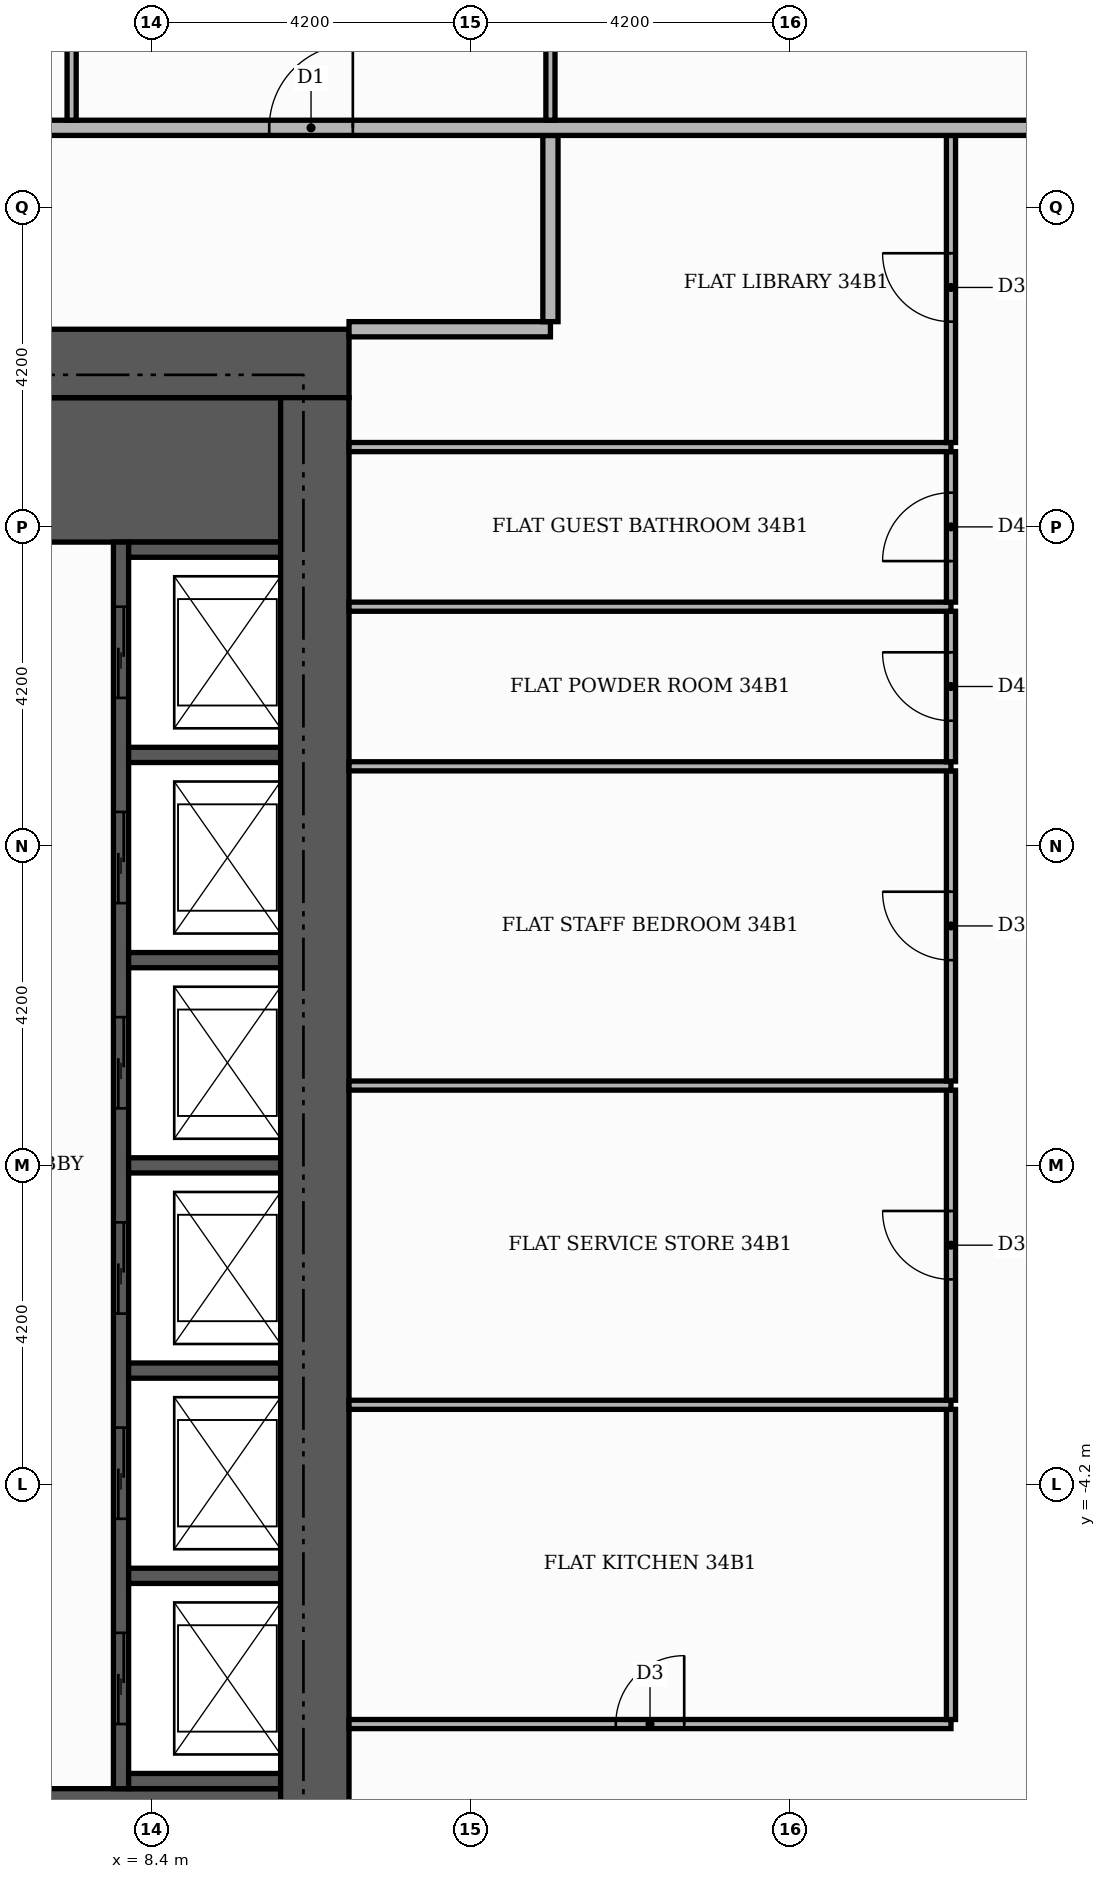
"""IFC4 building model, lengths in metres.
Left out: names, types, materials, properties, quantities, classifications, styles, units other than length and angle.
Written with IfcOpenShell. Run it as: python <this file> out.ifc"""

import sys

from ifc_helpers import new_model, si_unit, direction, frame, frame_2d, origin, place, context, subcontext, project, spatial, rectangle, extrude, element, fill, save


model = new_model("IFC4")
c1 = context("Model", 3, precision=1e-05, world=origin(), true_north=direction((0.0, 1.0)))
c2 = subcontext(c1, "Body", "Model", "MODEL_VIEW")
j1 = project(units=[si_unit("LENGTHUNIT", "METRE"), si_unit("PLANEANGLEUNIT", "RADIAN")], contexts=[c1])
p1 = place(None, origin())
s1 = spatial("IfcSite", under=j1, at=p1, CompositionType="ELEMENT")
p2 = place(p1, origin())
s2 = spatial("IfcBuilding", under=s1, at=p2, CompositionType="ELEMENT")
p3 = place(p2, frame((0.0, 0.0, 145.5)))
s3 = spatial("IfcBuildingStorey", under=s2, at=p3, CompositionType="ELEMENT", Elevation=145.5)
for number, where, z_axis, x_axis in (
    (1, (5.5, -9.15, 0.0), (0.0, 0.0, 1.0), (1.0, 0.0, 0.0)),
    (2, (5.5, 9.15, 0.0), (0.0, 0.0, 1.0), (1.0, 0.0, 0.0)),
):
    element("IfcWall", number, at=place(p3, frame(where, z_axis=z_axis, x_axis=x_axis)), inside=s3, PredefinedType="SHEAR", context=c2, shape_type="SweptSolid", body=[
        extrude(rectangle(XDim=4.6, YDim=1.9, at=frame_2d((2.3, 0.0))), origin(), (0.0, 0.0, 1.0), 3.48),
    ])
p4 = place(p3, frame((8.0, -8.2, 0.0), z_axis=(0.0, 0.0, 1.0), x_axis=(0.0, 1.0, 0.0)))
e3 = element("IfcWall", 3, at=p4, inside=s3, PredefinedType="SHEAR", context=c2, shape_type="SweptSolid", body=[
    extrude(rectangle(XDim=16.4, YDim=0.2, at=frame_2d((8.2, 0.0))), origin(), (0.0, 0.0, 1.0), 3.48),
])
p5 = place(p4, frame((0.85, 0.0, 0.0)))
e4 = element("IfcOpeningElement", 4, at=p5, cuts=e3, PredefinedType="OPENING", context=c2, shape_type="SweptSolid", body=[
    extrude(rectangle(XDim=1.2, YDim=2.1, at=frame_2d((0.6, 1.05))), frame((0.0, 0.11, 0.0), z_axis=(0.0, -1.0, 0.0), x_axis=(1.0, 0.0, 0.0)), (0.0, 0.0, 1.0), 0.22),
])
p6 = place(p4, frame((3.55, 0.0, 0.0)))
e5 = element("IfcOpeningElement", 5, at=p6, cuts=e3, PredefinedType="OPENING", context=c2, shape_type="SweptSolid", body=[
    extrude(rectangle(XDim=1.2, YDim=2.1, at=frame_2d((0.6, 1.05))), frame((0.0, 0.11, 0.0), z_axis=(0.0, -1.0, 0.0), x_axis=(1.0, 0.0, 0.0)), (0.0, 0.0, 1.0), 0.22),
])
p7 = place(p4, frame((6.25, 0.0, 0.0)))
e6 = element("IfcOpeningElement", 6, at=p7, cuts=e3, PredefinedType="OPENING", context=c2, shape_type="SweptSolid", body=[
    extrude(rectangle(XDim=1.2, YDim=2.1, at=frame_2d((0.6, 1.05))), frame((0.0, 0.11, 0.0), z_axis=(0.0, -1.0, 0.0), x_axis=(1.0, 0.0, 0.0)), (0.0, 0.0, 1.0), 0.22),
])
p8 = place(p4, frame((8.95, 0.0, 0.0)))
e7 = element("IfcOpeningElement", 7, at=p8, cuts=e3, PredefinedType="OPENING", context=c2, shape_type="SweptSolid", body=[
    extrude(rectangle(XDim=1.2, YDim=2.1, at=frame_2d((0.6, 1.05))), frame((0.0, 0.11, 0.0), z_axis=(0.0, -1.0, 0.0), x_axis=(1.0, 0.0, 0.0)), (0.0, 0.0, 1.0), 0.22),
])
p9 = place(p4, frame((11.65, 0.0, 0.0)))
e8 = element("IfcOpeningElement", 8, at=p9, cuts=e3, PredefinedType="OPENING", context=c2, shape_type="SweptSolid", body=[
    extrude(rectangle(XDim=1.2, YDim=2.1, at=frame_2d((0.6, 1.05))), frame((0.0, 0.11, 0.0), z_axis=(0.0, -1.0, 0.0), x_axis=(1.0, 0.0, 0.0)), (0.0, 0.0, 1.0), 0.22),
])
p10 = place(p4, frame((14.35, 0.0, 0.0)))
e9 = element("IfcOpeningElement", 9, at=p10, cuts=e3, PredefinedType="OPENING", context=c2, shape_type="SweptSolid", body=[
    extrude(rectangle(XDim=1.2, YDim=2.1, at=frame_2d((0.6, 1.05))), frame((0.0, 0.11, 0.0), z_axis=(0.0, -1.0, 0.0), x_axis=(1.0, 0.0, 0.0)), (0.0, 0.0, 1.0), 0.22),
])
for number, where, z_axis, x_axis in (
    (10, (8.1, -8.1, 0.0), (0.0, 0.0, 1.0), (1.0, 0.0, 0.0)),
    (11, (8.1, -5.4, 0.0), (0.0, 0.0, 1.0), (1.0, 0.0, 0.0)),
    (12, (8.1, -2.7, 0.0), (0.0, 0.0, 1.0), (1.0, 0.0, 0.0)),
    (13, (8.1, 0.0, 0.0), (0.0, 0.0, 1.0), (1.0, 0.0, 0.0)),
    (14, (8.1, 2.7, 0.0), (0.0, 0.0, 1.0), (1.0, 0.0, 0.0)),
    (15, (8.1, 5.4, 0.0), (0.0, 0.0, 1.0), (1.0, 0.0, 0.0)),
    (16, (8.1, 8.1, 0.0), (0.0, 0.0, 1.0), (1.0, 0.0, 0.0)),
):
    element("IfcWall", number, at=place(p3, frame(where, z_axis=z_axis, x_axis=x_axis)), inside=s3, PredefinedType="SHEAR", context=c2, shape_type="SweptSolid", body=[
        extrude(rectangle(XDim=2.0, YDim=0.2, at=frame_2d((1.0, 0.0))), origin(), (0.0, 0.0, 1.0), 3.48),
    ])
p11 = place(p3, frame((-11.0, 10.55, 0.0), z_axis=(0.0, 0.0, 1.0), x_axis=(1.0, 0.0, 0.0)))
e17 = element("IfcWall", 17, at=p11, inside=s3, PredefinedType="SHEAR", context=c2, shape_type="SweptSolid", body=[
    extrude(rectangle(XDim=22.0, YDim=0.9, at=frame_2d((11.0, 0.0))), origin(), (0.0, 0.0, 1.0), 3.48),
])
p12 = place(p11, frame((13.3, 0.0, 0.0)))
e18 = element("IfcOpeningElement", 18, at=p12, cuts=e17, PredefinedType="OPENING", context=c2, shape_type="SweptSolid", body=[
    extrude(rectangle(XDim=1.8, YDim=2.2, at=frame_2d((0.9, 1.1))), frame((0.0, 0.46, 0.0), z_axis=(0.0, -1.0, 0.0), x_axis=(1.0, 0.0, 0.0)), (0.0, 0.0, 1.0), 0.92),
])
p13 = place(p3, frame((10.55, -10.1, 0.0), z_axis=(0.0, 0.0, 1.0), x_axis=(0.0, 1.0, 0.0)))
e19 = element("IfcWall", 19, at=p13, inside=s3, PredefinedType="SHEAR", context=c2, shape_type="SweptSolid", body=[
    extrude(rectangle(XDim=20.2, YDim=0.9, at=frame_2d((10.1, 0.0))), origin(), (0.0, 0.0, 1.0), 3.48),
])
p14 = place(p3, frame((11.0, -7.35, 0.0), z_axis=(0.0, 0.0, 1.0), x_axis=(1.0, 0.0, 0.0)))
e20 = element("IfcWall", 20, at=p14, inside=s3, PredefinedType="PARTITIONING", context=c2, shape_type="SweptSolid", body=[
    extrude(rectangle(XDim=7.92, YDim=0.12, at=frame_2d((3.96, 0.0))), origin(), (0.0, 0.0, 1.0), 3.48),
])
p15 = place(p14, frame((3.51, 0.0, 0.0)))
e21 = element("IfcOpeningElement", 21, at=p15, cuts=e20, PredefinedType="OPENING", context=c2, shape_type="SweptSolid", body=[
    extrude(rectangle(XDim=0.9, YDim=2.1, at=frame_2d((0.45, 1.05))), frame((0.0, 0.07, 0.0), z_axis=(0.0, -1.0, 0.0), x_axis=(1.0, 0.0, 0.0)), (0.0, 0.0, 1.0), 0.14),
])
p16 = place(p3, frame((18.92, -7.29, 0.0), z_axis=(0.0, 0.0, 1.0), x_axis=(0.0, 1.0, 0.0)))
e22 = element("IfcWall", 22, at=p16, inside=s3, PredefinedType="PARTITIONING", context=c2, shape_type="SweptSolid", body=[
    extrude(rectangle(XDim=4.08, YDim=0.12, at=frame_2d((2.04, 0.0))), origin(), (0.0, 0.0, 1.0), 3.48),
])
p17 = place(p3, frame((11.0, -3.15, 0.0), z_axis=(0.0, 0.0, 1.0), x_axis=(1.0, 0.0, 0.0)))
e23 = element("IfcWall", 23, at=p17, inside=s3, PredefinedType="PARTITIONING", context=c2, shape_type="SweptSolid", body=[
    extrude(rectangle(XDim=7.92, YDim=0.12, at=frame_2d((3.96, 0.0))), origin(), (0.0, 0.0, 1.0), 3.48),
])
p18 = place(p3, frame((18.92, -3.09, 0.0), z_axis=(0.0, 0.0, 1.0), x_axis=(0.0, 1.0, 0.0)))
e24 = element("IfcWall", 24, at=p18, inside=s3, PredefinedType="PARTITIONING", context=c2, shape_type="SweptSolid", body=[
    extrude(rectangle(XDim=4.08, YDim=0.12, at=frame_2d((2.04, 0.0))), origin(), (0.0, 0.0, 1.0), 3.48),
])
p19 = place(p18, frame((1.59, 0.0, 0.0)))
e25 = element("IfcOpeningElement", 25, at=p19, cuts=e24, PredefinedType="OPENING", context=c2, shape_type="SweptSolid", body=[
    extrude(rectangle(XDim=0.9, YDim=2.1, at=frame_2d((0.45, 1.05))), frame((0.0, 0.07, 0.0), z_axis=(0.0, -1.0, 0.0), x_axis=(1.0, 0.0, 0.0)), (0.0, 0.0, 1.0), 0.14),
])
p20 = place(p3, frame((11.0, 1.05, 0.0), z_axis=(0.0, 0.0, 1.0), x_axis=(1.0, 0.0, 0.0)))
e26 = element("IfcWall", 26, at=p20, inside=s3, PredefinedType="PARTITIONING", context=c2, shape_type="SweptSolid", body=[
    extrude(rectangle(XDim=7.92, YDim=0.12, at=frame_2d((3.96, 0.0))), origin(), (0.0, 0.0, 1.0), 3.48),
])
p21 = place(p3, frame((18.92, 1.11, 0.0), z_axis=(0.0, 0.0, 1.0), x_axis=(0.0, 1.0, 0.0)))
e27 = element("IfcWall", 27, at=p21, inside=s3, PredefinedType="PARTITIONING", context=c2, shape_type="SweptSolid", body=[
    extrude(rectangle(XDim=4.08, YDim=0.12, at=frame_2d((2.04, 0.0))), origin(), (0.0, 0.0, 1.0), 3.48),
])
p22 = place(p21, frame((1.59, 0.0, 0.0)))
e28 = element("IfcOpeningElement", 28, at=p22, cuts=e27, PredefinedType="OPENING", context=c2, shape_type="SweptSolid", body=[
    extrude(rectangle(XDim=0.9, YDim=2.1, at=frame_2d((0.45, 1.05))), frame((0.0, 0.07, 0.0), z_axis=(0.0, -1.0, 0.0), x_axis=(1.0, 0.0, 0.0)), (0.0, 0.0, 1.0), 0.14),
])
p23 = place(p3, frame((11.0, 5.25, 0.0), z_axis=(0.0, 0.0, 1.0), x_axis=(1.0, 0.0, 0.0)))
e29 = element("IfcWall", 29, at=p23, inside=s3, PredefinedType="PARTITIONING", context=c2, shape_type="SweptSolid", body=[
    extrude(rectangle(XDim=7.92, YDim=0.12, at=frame_2d((3.96, 0.0))), origin(), (0.0, 0.0, 1.0), 3.48),
])
p24 = place(p3, frame((18.92, 5.31, 0.0), z_axis=(0.0, 0.0, 1.0), x_axis=(0.0, 1.0, 0.0)))
e30 = element("IfcWall", 30, at=p24, inside=s3, PredefinedType="PARTITIONING", context=c2, shape_type="SweptSolid", body=[
    extrude(rectangle(XDim=1.98, YDim=0.12, at=frame_2d((0.99, 0.0))), origin(), (0.0, 0.0, 1.0), 3.48),
])
p25 = place(p24, frame((0.54, 0.0, 0.0)))
e31 = element("IfcOpeningElement", 31, at=p25, cuts=e30, PredefinedType="OPENING", context=c2, shape_type="SweptSolid", body=[
    extrude(rectangle(XDim=0.9, YDim=2.1, at=frame_2d((0.45, 1.05))), frame((0.0, 0.07, 0.0), z_axis=(0.0, -1.0, 0.0), x_axis=(1.0, 0.0, 0.0)), (0.0, 0.0, 1.0), 0.14),
])
p26 = place(p3, frame((11.0, 7.35, 0.0), z_axis=(0.0, 0.0, 1.0), x_axis=(1.0, 0.0, 0.0)))
e32 = element("IfcWall", 32, at=p26, inside=s3, PredefinedType="PARTITIONING", context=c2, shape_type="SweptSolid", body=[
    extrude(rectangle(XDim=7.92, YDim=0.12, at=frame_2d((3.96, 0.0))), origin(), (0.0, 0.0, 1.0), 3.48),
])
p27 = place(p3, frame((18.92, 7.41, 0.0), z_axis=(0.0, 0.0, 1.0), x_axis=(0.0, 1.0, 0.0)))
e33 = element("IfcWall", 33, at=p27, inside=s3, PredefinedType="PARTITIONING", context=c2, shape_type="SweptSolid", body=[
    extrude(rectangle(XDim=1.98, YDim=0.12, at=frame_2d((0.99, 0.0))), origin(), (0.0, 0.0, 1.0), 3.48),
])
p28 = place(p27, frame((0.54, 0.0, 0.0)))
e34 = element("IfcOpeningElement", 34, at=p28, cuts=e33, PredefinedType="OPENING", context=c2, shape_type="SweptSolid", body=[
    extrude(rectangle(XDim=0.9, YDim=2.1, at=frame_2d((0.45, 1.05))), frame((0.0, 0.07, 0.0), z_axis=(0.0, -1.0, 0.0), x_axis=(1.0, 0.0, 0.0)), (0.0, 0.0, 1.0), 0.14),
])
p29 = place(p3, frame((11.0, 9.45, 0.0), z_axis=(0.0, 0.0, 1.0), x_axis=(1.0, 0.0, 0.0)))
e35 = element("IfcWall", 35, at=p29, inside=s3, PredefinedType="PARTITIONING", context=c2, shape_type="SweptSolid", body=[
    extrude(rectangle(XDim=7.92, YDim=0.12, at=frame_2d((3.96, 0.0))), origin(), (0.0, 0.0, 1.0), 3.48),
])
p30 = place(p3, frame((18.92, 9.51, 0.0), z_axis=(0.0, 0.0, 1.0), x_axis=(0.0, 1.0, 0.0)))
e36 = element("IfcWall", 36, at=p30, inside=s3, PredefinedType="PARTITIONING", context=c2, shape_type="SweptSolid", body=[
    extrude(rectangle(XDim=4.04, YDim=0.12, at=frame_2d((2.02, 0.0))), origin(), (0.0, 0.0, 1.0), 3.48),
])
p31 = place(p30, frame((1.59, 0.0, 0.0)))
e37 = element("IfcOpeningElement", 37, at=p31, cuts=e36, PredefinedType="OPENING", context=c2, shape_type="SweptSolid", body=[
    extrude(rectangle(XDim=0.9, YDim=2.1, at=frame_2d((0.45, 1.05))), frame((0.0, 0.07, 0.0), z_axis=(0.0, -1.0, 0.0), x_axis=(1.0, 0.0, 0.0)), (0.0, 0.0, 1.0), 0.14),
])
p32 = place(p3, frame((11.0, 11.0, 0.0), z_axis=(0.0, 0.0, 1.0), x_axis=(1.0, 0.0, 0.0)))
e38 = element("IfcWall", 38, at=p32, inside=s3, PredefinedType="PARTITIONING", context=c2, shape_type="SweptSolid", body=[
    extrude(rectangle(XDim=2.65, YDim=0.2, at=frame_2d((1.325, 0.0))), origin(), (0.0, 0.0, 1.0), 3.48),
])
p33 = place(p3, frame((13.65, 11.1, 0.0), z_axis=(0.0, 0.0, 1.0), x_axis=(0.0, 1.0, 0.0)))
e39 = element("IfcWall", 39, at=p33, inside=s3, PredefinedType="PARTITIONING", context=c2, shape_type="SweptSolid", body=[
    extrude(rectangle(XDim=2.45, YDim=0.2, at=frame_2d((1.225, 0.0))), origin(), (0.0, 0.0, 1.0), 3.48),
])
p34 = place(p3, frame((-13.65, 13.65, 0.0), z_axis=(0.0, 0.0, 1.0), x_axis=(1.0, 0.0, 0.0)))
e40 = element("IfcWall", 40, at=p34, inside=s3, PredefinedType="PARTITIONING", context=c2, shape_type="SweptSolid", body=[
    extrude(rectangle(XDim=39.07, YDim=0.2, at=frame_2d((19.535, 0.0))), origin(), (0.0, 0.0, 1.0), 3.48),
])
p35 = place(p34, frame((23.6, 0.0, 0.0)))
e41 = element("IfcOpeningElement", 41, at=p35, cuts=e40, PredefinedType="OPENING", context=c2, shape_type="SweptSolid", body=[
    extrude(rectangle(XDim=1.1, YDim=2.4, at=frame_2d((0.55, 1.2))), frame((0.0, 0.11, 0.0), z_axis=(0.0, -1.0, 0.0), x_axis=(1.0, 0.0, 0.0)), (0.0, 0.0, 1.0), 0.22),
])
p36 = place(p3, frame((7.35, 13.75, 0.0), z_axis=(0.0, 0.0, 1.0), x_axis=(0.0, 1.0, 0.0)))
e42 = element("IfcWall", 42, at=p36, inside=s3, PredefinedType="PARTITIONING", context=c2, shape_type="SweptSolid", body=[
    extrude(rectangle(XDim=5.11, YDim=0.12, at=frame_2d((2.555, 0.0))), origin(), (0.0, 0.0, 1.0), 3.48),
])
p37 = place(p3, frame((13.65, 13.75, 0.0), z_axis=(0.0, 0.0, 1.0), x_axis=(0.0, 1.0, 0.0)))
e43 = element("IfcWall", 43, at=p37, inside=s3, PredefinedType="PARTITIONING", context=c2, shape_type="SweptSolid", body=[
    extrude(rectangle(XDim=6.61, YDim=0.12, at=frame_2d((3.305, 0.0))), origin(), (0.0, 0.0, 1.0), 3.48),
])
p38 = place(p37, frame((2.835, 0.0, 0.0)))
e44 = element("IfcOpeningElement", 44, at=p38, cuts=e43, PredefinedType="OPENING", context=c2, shape_type="SweptSolid", body=[
    extrude(rectangle(XDim=0.9, YDim=2.1, at=frame_2d((0.45, 1.05))), frame((0.0, 0.07, 0.0), z_axis=(0.0, -1.0, 0.0), x_axis=(1.0, 0.0, 0.0)), (0.0, 0.0, 1.0), 0.14),
])
p39 = place(p5, origin())
e45 = element("IfcDoor", 45, at=p39, inside=s3, OperationType="SLIDING_TO_LEFT", PredefinedType="DOOR", context=c2, shape_type="SweptSolid", body=[
    extrude(rectangle(XDim=1.2, YDim=2.1, at=frame_2d((0.6, 1.05))), frame((0.0, 0.025, 0.0), z_axis=(0.0, -1.0, 0.0), x_axis=(1.0, 0.0, 0.0)), (0.0, 0.0, 1.0), 0.05),
])
fill(e4, e45)
p40 = place(p6, origin())
e46 = element("IfcDoor", 46, at=p40, inside=s3, OperationType="SLIDING_TO_LEFT", PredefinedType="DOOR", context=c2, shape_type="SweptSolid", body=[
    extrude(rectangle(XDim=1.2, YDim=2.1, at=frame_2d((0.6, 1.05))), frame((0.0, 0.025, 0.0), z_axis=(0.0, -1.0, 0.0), x_axis=(1.0, 0.0, 0.0)), (0.0, 0.0, 1.0), 0.05),
])
fill(e5, e46)
p41 = place(p7, origin())
e47 = element("IfcDoor", 47, at=p41, inside=s3, OperationType="SLIDING_TO_LEFT", PredefinedType="DOOR", context=c2, shape_type="SweptSolid", body=[
    extrude(rectangle(XDim=1.2, YDim=2.1, at=frame_2d((0.6, 1.05))), frame((0.0, 0.025, 0.0), z_axis=(0.0, -1.0, 0.0), x_axis=(1.0, 0.0, 0.0)), (0.0, 0.0, 1.0), 0.05),
])
fill(e6, e47)
p42 = place(p8, origin())
e48 = element("IfcDoor", 48, at=p42, inside=s3, OperationType="SLIDING_TO_LEFT", PredefinedType="DOOR", context=c2, shape_type="SweptSolid", body=[
    extrude(rectangle(XDim=1.2, YDim=2.1, at=frame_2d((0.6, 1.05))), frame((0.0, 0.025, 0.0), z_axis=(0.0, -1.0, 0.0), x_axis=(1.0, 0.0, 0.0)), (0.0, 0.0, 1.0), 0.05),
])
fill(e7, e48)
p43 = place(p9, origin())
e49 = element("IfcDoor", 49, at=p43, inside=s3, OperationType="SLIDING_TO_LEFT", PredefinedType="DOOR", context=c2, shape_type="SweptSolid", body=[
    extrude(rectangle(XDim=1.2, YDim=2.1, at=frame_2d((0.6, 1.05))), frame((0.0, 0.025, 0.0), z_axis=(0.0, -1.0, 0.0), x_axis=(1.0, 0.0, 0.0)), (0.0, 0.0, 1.0), 0.05),
])
fill(e8, e49)
p44 = place(p10, origin())
e50 = element("IfcDoor", 50, at=p44, inside=s3, OperationType="SLIDING_TO_LEFT", PredefinedType="DOOR", context=c2, shape_type="SweptSolid", body=[
    extrude(rectangle(XDim=1.2, YDim=2.1, at=frame_2d((0.6, 1.05))), frame((0.0, 0.025, 0.0), z_axis=(0.0, -1.0, 0.0), x_axis=(1.0, 0.0, 0.0)), (0.0, 0.0, 1.0), 0.05),
])
fill(e9, e50)
p45 = place(p15, origin())
e51 = element("IfcDoor", 51, at=p45, inside=s3, OperationType="SINGLE_SWING_RIGHT", PredefinedType="DOOR", context=c2, shape_type="SweptSolid", body=[
    extrude(rectangle(XDim=0.9, YDim=2.1, at=frame_2d((0.45, 1.05))), frame((0.0, 0.025, 0.0), z_axis=(0.0, -1.0, 0.0), x_axis=(1.0, 0.0, 0.0)), (0.0, 0.0, 1.0), 0.05),
])
fill(e21, e51)
p46 = place(p19, origin())
e52 = element("IfcDoor", 52, at=p46, inside=s3, OperationType="SINGLE_SWING_RIGHT", PredefinedType="DOOR", context=c2, shape_type="SweptSolid", body=[
    extrude(rectangle(XDim=0.9, YDim=2.1, at=frame_2d((0.45, 1.05))), frame((0.0, 0.025, 0.0), z_axis=(0.0, -1.0, 0.0), x_axis=(1.0, 0.0, 0.0)), (0.0, 0.0, 1.0), 0.05),
])
fill(e25, e52)
p47 = place(p22, origin())
e53 = element("IfcDoor", 53, at=p47, inside=s3, OperationType="SINGLE_SWING_RIGHT", PredefinedType="DOOR", context=c2, shape_type="SweptSolid", body=[
    extrude(rectangle(XDim=0.9, YDim=2.1, at=frame_2d((0.45, 1.05))), frame((0.0, 0.025, 0.0), z_axis=(0.0, -1.0, 0.0), x_axis=(1.0, 0.0, 0.0)), (0.0, 0.0, 1.0), 0.05),
])
fill(e28, e53)
p48 = place(p25, origin())
e54 = element("IfcDoor", 54, at=p48, inside=s3, OperationType="SINGLE_SWING_RIGHT", PredefinedType="DOOR", context=c2, shape_type="SweptSolid", body=[
    extrude(rectangle(XDim=0.9, YDim=2.1, at=frame_2d((0.45, 1.05))), frame((0.0, 0.025, 0.0), z_axis=(0.0, -1.0, 0.0), x_axis=(1.0, 0.0, 0.0)), (0.0, 0.0, 1.0), 0.05),
])
fill(e31, e54)
p49 = place(p28, origin())
e55 = element("IfcDoor", 55, at=p49, inside=s3, OperationType="SINGLE_SWING_LEFT", PredefinedType="DOOR", context=c2, shape_type="SweptSolid", body=[
    extrude(rectangle(XDim=0.9, YDim=2.1, at=frame_2d((0.45, 1.05))), frame((0.0, 0.025, 0.0), z_axis=(0.0, -1.0, 0.0), x_axis=(1.0, 0.0, 0.0)), (0.0, 0.0, 1.0), 0.05),
])
fill(e34, e55)
p50 = place(p31, origin())
e56 = element("IfcDoor", 56, at=p50, inside=s3, OperationType="SINGLE_SWING_RIGHT", PredefinedType="DOOR", context=c2, shape_type="SweptSolid", body=[
    extrude(rectangle(XDim=0.9, YDim=2.1, at=frame_2d((0.45, 1.05))), frame((0.0, 0.025, 0.0), z_axis=(0.0, -1.0, 0.0), x_axis=(1.0, 0.0, 0.0)), (0.0, 0.0, 1.0), 0.05),
])
fill(e37, e56)
p51 = place(p35, origin())
e57 = element("IfcDoor", 57, at=p51, inside=s3, OperationType="SINGLE_SWING_RIGHT", PredefinedType="DOOR", context=c2, shape_type="SweptSolid", body=[
    extrude(rectangle(XDim=1.1, YDim=2.4, at=frame_2d((0.55, 1.2))), frame((0.0, 0.025, 0.0), z_axis=(0.0, -1.0, 0.0), x_axis=(1.0, 0.0, 0.0)), (0.0, 0.0, 1.0), 0.05),
])
fill(e41, e57)
save(model, sys.argv[1])
